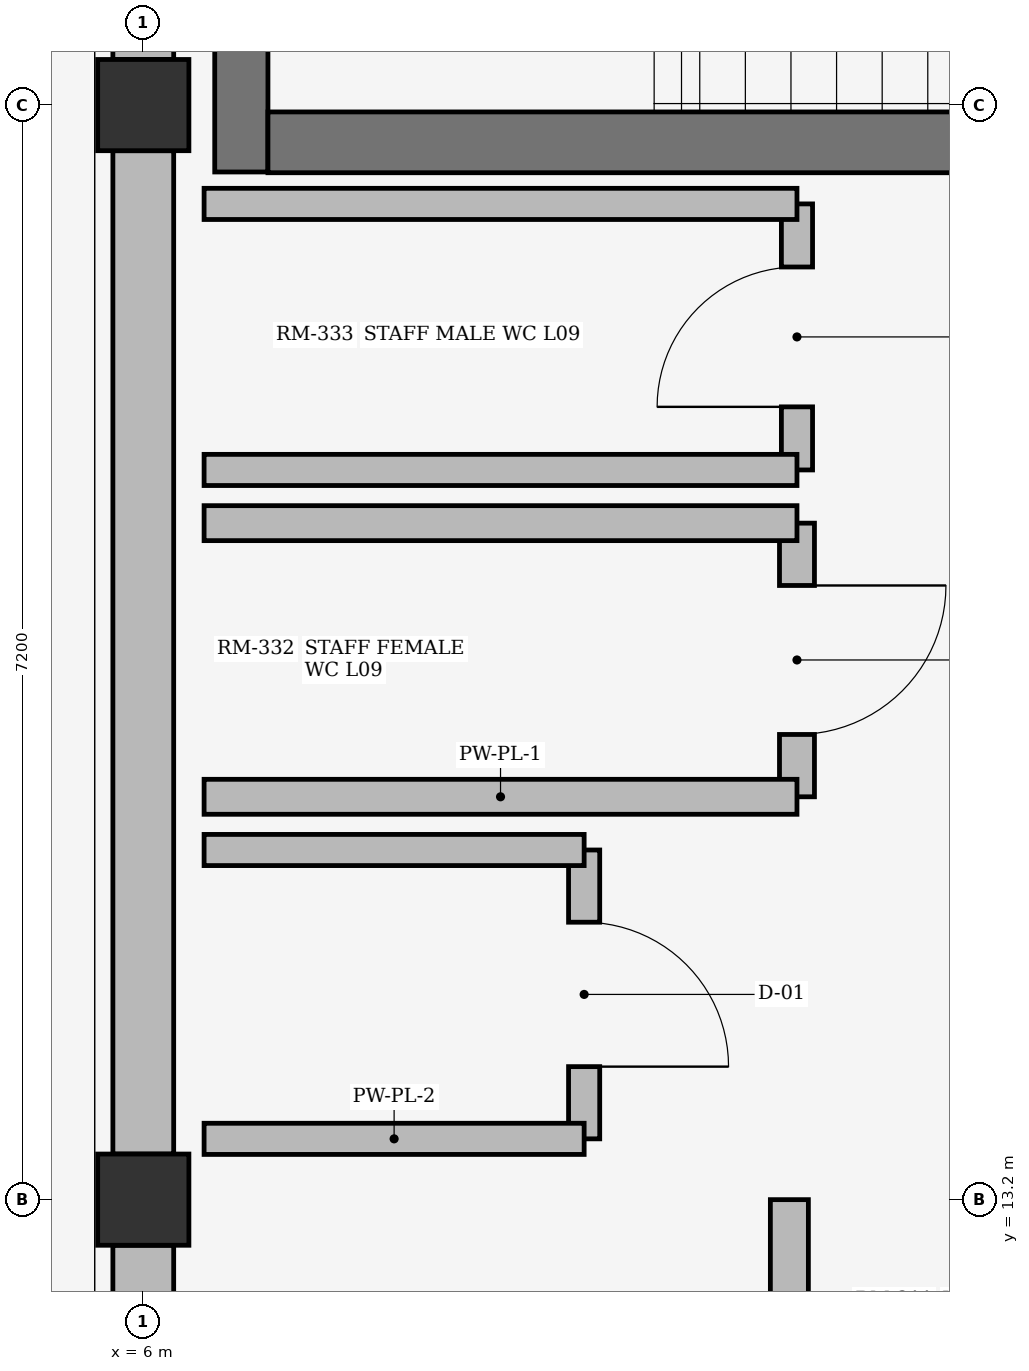
"""IFC4 building model, lengths in metres.
Left out: names, types, materials, properties, quantities, classifications, styles, units other than length and angle.
Written with IfcOpenShell. Run it as: python <this file> out.ifc"""

import sys

from ifc_helpers import new_model, si_unit, direction, frame, frame_2d, origin, origin_2d, place, context, subcontext, project, spatial, rectangle, extrude, element, fill, save


model = new_model("IFC4")
c1 = context("Model", 3, precision=1e-05, world=origin(), true_north=direction((0.0, 1.0)))
c2 = subcontext(c1, "Body", "Model", "MODEL_VIEW")
j1 = project(units=[si_unit("LENGTHUNIT", "METRE"), si_unit("PLANEANGLEUNIT", "RADIAN")], contexts=[c1])
p1 = place(None, origin())
s1 = spatial("IfcSite", under=j1, at=p1, CompositionType="ELEMENT")
p2 = place(p1, origin())
s2 = spatial("IfcBuilding", under=s1, at=p2, CompositionType="ELEMENT")
p3 = place(p2, frame((0.0, 0.0, 36.6)))
s3 = spatial("IfcBuildingStorey", under=s2, at=p3, CompositionType="ELEMENT", Elevation=36.6)
for number, where, z_axis, x_axis in (
    (1, (6.0, 13.2, 0.0), (0.0, 0.0, 1.0), (1.0, 0.0, 0.0)),
    (2, (6.0, 20.4, 0.0), (0.0, 0.0, 1.0), (1.0, 0.0, 0.0)),
):
    element("IfcColumn", number, at=place(p3, frame(where, z_axis=z_axis, x_axis=x_axis)), inside=s3, PredefinedType="COLUMN", context=c2, shape_type="SweptSolid", body=[
        extrude(rectangle(XDim=0.6, YDim=0.6, at=origin_2d()), origin(), (0.0, 0.0, 1.0), 3.62),
    ])
p4 = place(p3, frame((6.0, 6.3, 0.0), z_axis=(0.0, 0.0, 1.0), x_axis=(0.0, 1.0, 0.0)))
e3 = element("IfcWall", 3, at=p4, inside=s3, PredefinedType="STANDARD", context=c2, shape_type="SweptSolid", body=[
    extrude(rectangle(XDim=6.6, YDim=0.4, at=frame_2d((3.3, 0.0))), origin(), (0.0, 0.0, 1.0), 3.1),
])
for number, where, z_axis, x_axis in (
    (4, (6.0, 13.5, 0.0), (0.0, 0.0, 1.0), (0.0, 1.0, 0.0)),
    (5, (6.0, 20.7, 0.0), (0.0, 0.0, 1.0), (0.0, 1.0, 0.0)),
):
    element("IfcWall", number, at=place(p3, frame(where, z_axis=z_axis, x_axis=x_axis)), inside=s3, PredefinedType="STANDARD", context=c2, shape_type="SweptSolid", body=[
        extrude(rectangle(XDim=6.6, YDim=0.4, at=frame_2d((3.3, 0.0))), origin(), (0.0, 0.0, 1.0), 3.1),
    ])
p5 = place(p3, frame((6.645, 24.55, 0.0), z_axis=(0.0, 0.0, 1.0), x_axis=(0.0, -1.0, 0.0)))
e6 = element("IfcWall", 6, at=p5, inside=s3, PredefinedType="SHEAR", context=c2, shape_type="SweptSolid", body=[
    extrude(rectangle(XDim=4.59, YDim=0.35, at=frame_2d((2.295, 0.0))), origin(), (0.0, 0.0, 1.0), 3.62),
])
p6 = place(p3, frame((14.8, 20.155, 0.0), z_axis=(0.0, 0.0, 1.0), x_axis=(-1.0, 0.0, 0.0)))
e7 = element("IfcWall", 7, at=p6, inside=s3, PredefinedType="SHEAR", context=c2, shape_type="SweptSolid", body=[
    extrude(rectangle(XDim=7.98, YDim=0.4, at=frame_2d((3.99, 0.0))), origin(), (0.0, 0.0, 1.0), 3.62),
])
p7 = place(p3, frame((8.9, 13.6, 0.0), z_axis=(0.0, 0.0, 1.0), x_axis=(0.0, 1.0, 0.0)))
e8 = element("IfcWall", 8, at=p7, inside=s3, PredefinedType="PLUMBINGWALL", context=c2, shape_type="SweptSolid", body=[
    extrude(rectangle(XDim=1.9, YDim=0.205, at=frame_2d((0.95, 0.0))), origin(), (0.0, 0.0, 1.0), 3.6),
])
p8 = place(p7, frame((0.475, 0.0, 0.0)))
e9 = element("IfcOpeningElement", 9, at=p8, cuts=e8, PredefinedType="OPENING", context=c2, shape_type="SweptSolid", body=[
    extrude(rectangle(XDim=0.95, YDim=2.15, at=frame_2d((0.475, 1.075))), frame((0.0, 0.113, 0.0), z_axis=(0.0, -1.0, 0.0), x_axis=(1.0, 0.0, 0.0)), (0.0, 0.0, 1.0), 0.225),
])
for number, where, z_axis, x_axis in (
    (10, (6.4, 13.6, 0.0), (0.0, 0.0, 1.0), (1.0, 0.0, 0.0)),
    (11, (6.4, 15.5, 0.0), (0.0, 0.0, 1.0), (1.0, 0.0, 0.0)),
):
    element("IfcWall", number, at=place(p3, frame(where, z_axis=z_axis, x_axis=x_axis)), inside=s3, PredefinedType="PLUMBINGWALL", context=c2, shape_type="SweptSolid", body=[
        extrude(rectangle(XDim=2.5, YDim=0.205, at=frame_2d((1.25, 0.0))), origin(), (0.0, 0.0, 1.0), 3.6),
    ])
p9 = place(p3, frame((10.3, 15.85, 0.0), z_axis=(0.0, 0.0, 1.0), x_axis=(0.0, 1.0, 0.0)))
e12 = element("IfcWall", 12, at=p9, inside=s3, PredefinedType="PLUMBINGWALL", context=c2, shape_type="SweptSolid", body=[
    extrude(rectangle(XDim=1.8, YDim=0.23, at=frame_2d((0.9, 0.0))), origin(), (0.0, 0.0, 1.0), 3.6),
])
p10 = place(p9, frame((0.41, 0.0, 0.0)))
e13 = element("IfcOpeningElement", 13, at=p10, cuts=e12, PredefinedType="OPENING", context=c2, shape_type="SweptSolid", body=[
    extrude(rectangle(XDim=0.98, YDim=2.1, at=frame_2d((0.49, 1.05))), frame((0.0, 0.125, 0.0), z_axis=(0.0, -1.0, 0.0), x_axis=(1.0, 0.0, 0.0)), (0.0, 0.0, 1.0), 0.25),
])
for number, where, z_axis, x_axis in (
    (14, (6.4, 15.85, 0.0), (0.0, 0.0, 1.0), (1.0, 0.0, 0.0)),
    (15, (6.4, 17.65, 0.0), (0.0, 0.0, 1.0), (1.0, 0.0, 0.0)),
):
    element("IfcWall", number, at=place(p3, frame(where, z_axis=z_axis, x_axis=x_axis)), inside=s3, PredefinedType="PLUMBINGWALL", context=c2, shape_type="SweptSolid", body=[
        extrude(rectangle(XDim=3.9, YDim=0.23, at=frame_2d((1.95, 0.0))), origin(), (0.0, 0.0, 1.0), 3.6),
    ])
p11 = place(p3, frame((10.3, 18.0, 0.0), z_axis=(0.0, 0.0, 1.0), x_axis=(0.0, 1.0, 0.0)))
e16 = element("IfcWall", 16, at=p11, inside=s3, PredefinedType="PLUMBINGWALL", context=c2, shape_type="SweptSolid", body=[
    extrude(rectangle(XDim=1.75, YDim=0.205, at=frame_2d((0.875, 0.0))), origin(), (0.0, 0.0, 1.0), 3.6),
])
p12 = place(p11, frame((0.415, 0.0, 0.0)))
e17 = element("IfcOpeningElement", 17, at=p12, cuts=e16, PredefinedType="OPENING", context=c2, shape_type="SweptSolid", body=[
    extrude(rectangle(XDim=0.92, YDim=2.1, at=frame_2d((0.46, 1.05))), frame((0.0, 0.113, 0.0), z_axis=(0.0, -1.0, 0.0), x_axis=(1.0, 0.0, 0.0)), (0.0, 0.0, 1.0), 0.225),
])
for number, where, z_axis, x_axis in (
    (18, (6.4, 18.0, 0.0), (0.0, 0.0, 1.0), (1.0, 0.0, 0.0)),
    (19, (6.4, 19.75, 0.0), (0.0, 0.0, 1.0), (1.0, 0.0, 0.0)),
):
    element("IfcWall", number, at=place(p3, frame(where, z_axis=z_axis, x_axis=x_axis)), inside=s3, PredefinedType="PLUMBINGWALL", context=c2, shape_type="SweptSolid", body=[
        extrude(rectangle(XDim=3.9, YDim=0.205, at=frame_2d((1.95, 0.0))), origin(), (0.0, 0.0, 1.0), 3.6),
    ])
p13 = place(p3, frame((10.25, 6.15, 0.0), z_axis=(0.0, 0.0, 1.0), x_axis=(0.0, 1.0, 0.0)))
e20 = element("IfcWall", 20, at=p13, inside=s3, PredefinedType="SOLIDWALL", context=c2, shape_type="SweptSolid", body=[
    extrude(rectangle(XDim=7.05, YDim=0.25, at=frame_2d((3.525, 0.0))), origin(), (0.0, 0.0, 1.0), 3.6),
])
p14 = place(p13, frame((2.625, 0.0, 0.0)))
e21 = element("IfcOpeningElement", 21, at=p14, cuts=e20, PredefinedType="OPENING", context=c2, shape_type="SweptSolid", body=[
    extrude(rectangle(XDim=1.8, YDim=2.25, at=frame_2d((0.9, 1.125))), frame((0.0, 0.135, 0.0), z_axis=(0.0, -1.0, 0.0), x_axis=(1.0, 0.0, 0.0)), (0.0, 0.0, 1.0), 0.27),
])
p15 = place(p8, frame((0.95, 0.0, 0.0), z_axis=(0.0, 0.0, 1.0), x_axis=(-1.0, 0.0, 0.0)))
e22 = element("IfcDoor", 22, at=p15, inside=s3, OperationType="SINGLE_SWING_LEFT", PredefinedType="DOOR", context=c2, shape_type="SweptSolid", body=[
    extrude(rectangle(XDim=0.95, YDim=2.15, at=frame_2d((0.475, 1.075))), frame((0.0, 0.025, 0.0), z_axis=(0.0, -1.0, 0.0), x_axis=(1.0, 0.0, 0.0)), (0.0, 0.0, 1.0), 0.05),
])
fill(e9, e22)
p16 = place(p10, origin())
e23 = element("IfcDoor", 23, at=p16, inside=s3, OperationType="SINGLE_SWING_RIGHT", PredefinedType="DOOR", context=c2, shape_type="SweptSolid", body=[
    extrude(rectangle(XDim=0.98, YDim=2.1, at=frame_2d((0.49, 1.05))), frame((0.0, 0.025, 0.0), z_axis=(0.0, -1.0, 0.0), x_axis=(1.0, 0.0, 0.0)), (0.0, 0.0, 1.0), 0.05),
])
fill(e13, e23)
p17 = place(p12, origin())
e24 = element("IfcDoor", 24, at=p17, inside=s3, OperationType="SINGLE_SWING_LEFT", PredefinedType="DOOR", context=c2, shape_type="SweptSolid", body=[
    extrude(rectangle(XDim=0.92, YDim=2.1, at=frame_2d((0.46, 1.05))), frame((0.0, 0.025, 0.0), z_axis=(0.0, -1.0, 0.0), x_axis=(1.0, 0.0, 0.0)), (0.0, 0.0, 1.0), 0.05),
])
fill(e17, e24)
save(model, sys.argv[1])
